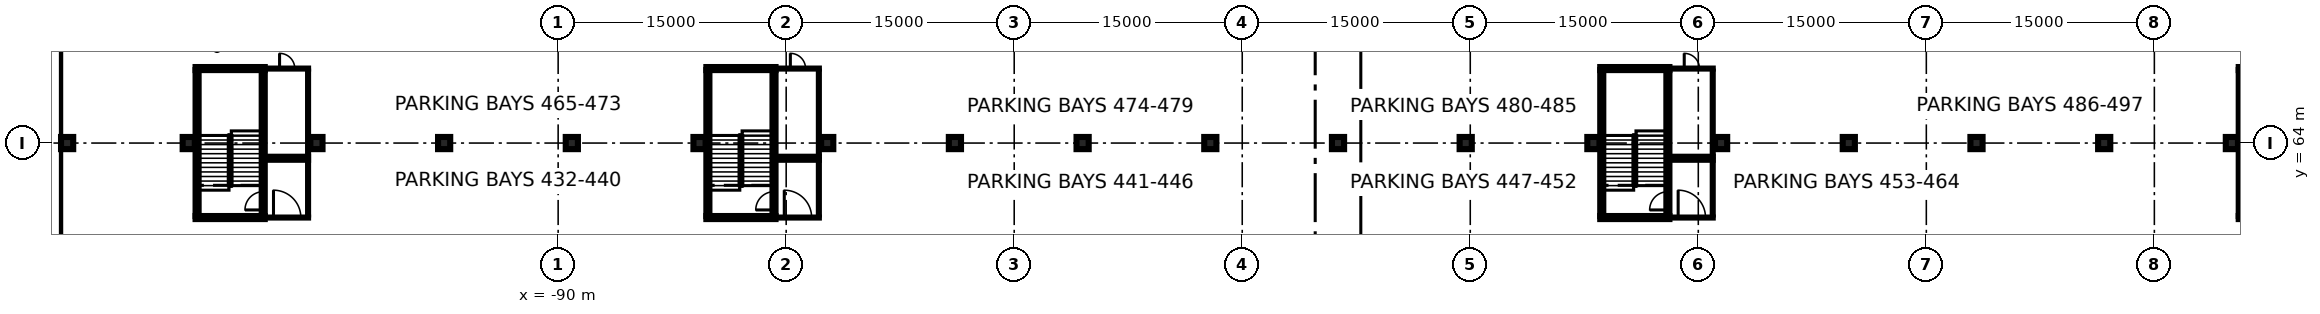
"""IFC4 building model, lengths in metres.
Left out: names, types, materials, properties, quantities, classifications, styles, units other than length and angle.
Written with IfcOpenShell. Run it as: python <this file> out.ifc"""

import sys

from ifc_helpers import new_model, si_unit, direction, frame, frame_2d, origin, origin_2d, place, context, subcontext, project, spatial, rectangle, extrude, element, fill, save


model = new_model("IFC4")
c1 = context("Model", 3, precision=1e-05, world=origin(), true_north=direction((0.0, 1.0)))
c2 = subcontext(c1, "Body", "Model", "MODEL_VIEW")
j1 = project(units=[si_unit("LENGTHUNIT", "METRE"), si_unit("PLANEANGLEUNIT", "RADIAN")], contexts=[c1])
p1 = place(None, origin())
s1 = spatial("IfcSite", under=j1, at=p1, CompositionType="ELEMENT")
p2 = place(p1, origin())
s2 = spatial("IfcBuilding", under=s1, at=p2, CompositionType="ELEMENT")
p3 = place(p2, frame((0.0, 0.0, -12.0)))
s3 = spatial("IfcBuildingStorey", under=s2, at=p3, CompositionType="ELEMENT", Elevation=-12.0)
p4 = place(p3, frame((-123.15, -80.0, 0.0), z_axis=(0.0, 0.0, 1.0), x_axis=(0.0, 1.0, 0.0)))
e1 = element("IfcWall", 1, at=p4, inside=s3, PredefinedType="USERDEFINED", context=c2, shape_type="SweptSolid", body=[
    extrude(rectangle(XDim=160.0, YDim=0.9, at=frame_2d((80.0, 0.0))), origin(), (0.0, 0.0, 1.0), 11.55),
])
p5 = place(p2, frame((0.0, 0.0, -3.6)))
s4 = spatial("IfcBuildingStorey", under=s2, at=p5, CompositionType="ELEMENT", Elevation=-3.6)
for number, where, z_axis, x_axis in (
    (2, (-122.3, 64.0, -0.4), (0.0, 0.0, 1.0), (1.0, 0.0, 0.0)),
    (3, (-114.3, 64.0, -0.4), (0.0, 0.0, 1.0), (1.0, 0.0, 0.0)),
    (4, (-105.9, 64.0, -0.4), (0.0, 0.0, 1.0), (1.0, 0.0, 0.0)),
    (5, (-97.5, 64.0, -0.4), (0.0, 0.0, 1.0), (1.0, 0.0, 0.0)),
    (6, (-89.1, 64.0, -0.4), (0.0, 0.0, 1.0), (1.0, 0.0, 0.0)),
    (7, (-80.7, 64.0, -0.4), (0.0, 0.0, 1.0), (1.0, 0.0, 0.0)),
    (8, (-72.3, 64.0, -0.4), (0.0, 0.0, 1.0), (1.0, 0.0, 0.0)),
    (9, (-63.9, 64.0, -0.4), (0.0, 0.0, 1.0), (1.0, 0.0, 0.0)),
    (10, (-55.5, 64.0, -0.4), (0.0, 0.0, 1.0), (1.0, 0.0, 0.0)),
    (11, (-47.1, 64.0, -0.4), (0.0, 0.0, 1.0), (1.0, 0.0, 0.0)),
    (12, (-38.7, 64.0, -0.4), (0.0, 0.0, 1.0), (1.0, 0.0, 0.0)),
    (13, (-30.3, 64.0, -0.4), (0.0, 0.0, 1.0), (1.0, 0.0, 0.0)),
    (14, (-21.9, 64.0, -0.4), (0.0, 0.0, 1.0), (1.0, 0.0, 0.0)),
    (15, (-13.5, 64.0, -0.4), (0.0, 0.0, 1.0), (1.0, 0.0, 0.0)),
    (16, (-5.1, 64.0, -0.4), (0.0, 0.0, 1.0), (1.0, 0.0, 0.0)),
    (17, (3.3, 64.0, -0.4), (0.0, 0.0, 1.0), (1.0, 0.0, 0.0)),
    (18, (11.7, 64.0, -0.4), (0.0, 0.0, 1.0), (1.0, 0.0, 0.0)),
    (19, (20.1, 64.0, -0.4), (0.0, 0.0, 1.0), (1.0, 0.0, 0.0)),
):
    element("IfcColumn", number, at=place(p5, frame(where, z_axis=z_axis, x_axis=x_axis)), inside=s4, PredefinedType="COLUMN", context=c2, shape_type="SweptSolid", body=[
        extrude(rectangle(XDim=0.8, YDim=0.8, at=origin_2d()), origin(), (0.0, 0.0, 1.0), 3.55),
    ])
p6 = place(p5, frame((-109.3, 59.1, 0.0), z_axis=(0.0, 0.0, 1.0), x_axis=(1.0, 0.0, 0.0)))
e20 = element("IfcWall", 20, at=p6, inside=s4, PredefinedType="PARTITIONING", context=c2, shape_type="SweptSolid", body=[
    extrude(rectangle(XDim=2.95, YDim=0.2, at=frame_2d((1.475, 0.0))), origin(), (0.0, 0.0, 1.0), 3.15),
])
p7 = place(p6, frame((0.575, 0.0, 0.0)))
e21 = element("IfcOpeningElement", 21, at=p7, cuts=e20, PredefinedType="OPENING", context=c2, shape_type="SweptSolid", body=[
    extrude(rectangle(XDim=1.8, YDim=2.1, at=frame_2d((0.9, 1.05))), frame((0.0, 0.11, 0.0), z_axis=(0.0, -1.0, 0.0), x_axis=(1.0, 0.0, 0.0)), (0.0, 0.0, 1.0), 0.22),
])
p8 = place(p5, frame((-109.3, 62.9, 0.0), z_axis=(0.0, 0.0, 1.0), x_axis=(1.0, 0.0, 0.0)))
e22 = element("IfcWall", 22, at=p8, inside=s4, PredefinedType="PARTITIONING", context=c2, shape_type="SweptSolid", body=[
    extrude(rectangle(XDim=2.95, YDim=0.2, at=frame_2d((1.475, 0.0))), origin(), (0.0, 0.0, 1.0), 3.15),
])
p9 = place(p5, frame((-106.45, 59.2, 0.0), z_axis=(0.0, 0.0, 1.0), x_axis=(0.0, 1.0, 0.0)))
e23 = element("IfcWall", 23, at=p9, inside=s4, PredefinedType="PARTITIONING", context=c2, shape_type="SweptSolid", body=[
    extrude(rectangle(XDim=3.6, YDim=0.2, at=frame_2d((1.8, 0.0))), origin(), (0.0, 0.0, 1.0), 3.15),
])
p10 = place(p5, frame((-109.3, 63.1, 0.0), z_axis=(0.0, 0.0, 1.0), x_axis=(1.0, 0.0, 0.0)))
e24 = element("IfcWall", 24, at=p10, inside=s4, PredefinedType="PARTITIONING", context=c2, shape_type="SweptSolid", body=[
    extrude(rectangle(XDim=2.95, YDim=0.2, at=frame_2d((1.475, 0.0))), origin(), (0.0, 0.0, 1.0), 3.15),
])
p11 = place(p5, frame((-109.3, 68.9, 0.0), z_axis=(0.0, 0.0, 1.0), x_axis=(1.0, 0.0, 0.0)))
e25 = element("IfcWall", 25, at=p11, inside=s4, PredefinedType="PARTITIONING", context=c2, shape_type="SweptSolid", body=[
    extrude(rectangle(XDim=2.95, YDim=0.2, at=frame_2d((1.475, 0.0))), origin(), (0.0, 0.0, 1.0), 3.15),
])
p12 = place(p11, frame((0.975, 0.0, 0.0)))
e26 = element("IfcOpeningElement", 26, at=p12, cuts=e25, PredefinedType="OPENING", context=c2, shape_type="SweptSolid", body=[
    extrude(rectangle(XDim=1.0, YDim=2.1, at=frame_2d((0.5, 1.05))), frame((0.0, 0.11, 0.0), z_axis=(0.0, -1.0, 0.0), x_axis=(1.0, 0.0, 0.0)), (0.0, 0.0, 1.0), 0.22),
])
p13 = place(p5, frame((-106.45, 63.2, 0.0), z_axis=(0.0, 0.0, 1.0), x_axis=(0.0, 1.0, 0.0)))
e27 = element("IfcWall", 27, at=p13, inside=s4, PredefinedType="PARTITIONING", context=c2, shape_type="SweptSolid", body=[
    extrude(rectangle(XDim=5.6, YDim=0.2, at=frame_2d((2.8, 0.0))), origin(), (0.0, 0.0, 1.0), 3.15),
])
p14 = place(p5, frame((-75.7, 59.1, 0.0), z_axis=(0.0, 0.0, 1.0), x_axis=(1.0, 0.0, 0.0)))
e28 = element("IfcWall", 28, at=p14, inside=s4, PredefinedType="PARTITIONING", context=c2, shape_type="SweptSolid", body=[
    extrude(rectangle(XDim=2.95, YDim=0.2, at=frame_2d((1.475, 0.0))), origin(), (0.0, 0.0, 1.0), 3.15),
])
p15 = place(p14, frame((0.575, 0.0, 0.0)))
e29 = element("IfcOpeningElement", 29, at=p15, cuts=e28, PredefinedType="OPENING", context=c2, shape_type="SweptSolid", body=[
    extrude(rectangle(XDim=1.8, YDim=2.1, at=frame_2d((0.9, 1.05))), frame((0.0, 0.11, 0.0), z_axis=(0.0, -1.0, 0.0), x_axis=(1.0, 0.0, 0.0)), (0.0, 0.0, 1.0), 0.22),
])
p16 = place(p5, frame((-75.7, 62.9, 0.0), z_axis=(0.0, 0.0, 1.0), x_axis=(1.0, 0.0, 0.0)))
e30 = element("IfcWall", 30, at=p16, inside=s4, PredefinedType="PARTITIONING", context=c2, shape_type="SweptSolid", body=[
    extrude(rectangle(XDim=2.95, YDim=0.2, at=frame_2d((1.475, 0.0))), origin(), (0.0, 0.0, 1.0), 3.15),
])
p17 = place(p5, frame((-72.85, 59.2, 0.0), z_axis=(0.0, 0.0, 1.0), x_axis=(0.0, 1.0, 0.0)))
e31 = element("IfcWall", 31, at=p17, inside=s4, PredefinedType="PARTITIONING", context=c2, shape_type="SweptSolid", body=[
    extrude(rectangle(XDim=3.6, YDim=0.2, at=frame_2d((1.8, 0.0))), origin(), (0.0, 0.0, 1.0), 3.15),
])
p18 = place(p5, frame((-75.7, 63.1, 0.0), z_axis=(0.0, 0.0, 1.0), x_axis=(1.0, 0.0, 0.0)))
e32 = element("IfcWall", 32, at=p18, inside=s4, PredefinedType="PARTITIONING", context=c2, shape_type="SweptSolid", body=[
    extrude(rectangle(XDim=2.95, YDim=0.2, at=frame_2d((1.475, 0.0))), origin(), (0.0, 0.0, 1.0), 3.15),
])
p19 = place(p5, frame((-75.7, 68.9, 0.0), z_axis=(0.0, 0.0, 1.0), x_axis=(1.0, 0.0, 0.0)))
e33 = element("IfcWall", 33, at=p19, inside=s4, PredefinedType="PARTITIONING", context=c2, shape_type="SweptSolid", body=[
    extrude(rectangle(XDim=2.95, YDim=0.2, at=frame_2d((1.475, 0.0))), origin(), (0.0, 0.0, 1.0), 3.15),
])
p20 = place(p19, frame((0.975, 0.0, 0.0)))
e34 = element("IfcOpeningElement", 34, at=p20, cuts=e33, PredefinedType="OPENING", context=c2, shape_type="SweptSolid", body=[
    extrude(rectangle(XDim=1.0, YDim=2.1, at=frame_2d((0.5, 1.05))), frame((0.0, 0.11, 0.0), z_axis=(0.0, -1.0, 0.0), x_axis=(1.0, 0.0, 0.0)), (0.0, 0.0, 1.0), 0.22),
])
p21 = place(p5, frame((-72.85, 63.2, 0.0), z_axis=(0.0, 0.0, 1.0), x_axis=(0.0, 1.0, 0.0)))
e35 = element("IfcWall", 35, at=p21, inside=s4, PredefinedType="PARTITIONING", context=c2, shape_type="SweptSolid", body=[
    extrude(rectangle(XDim=5.6, YDim=0.2, at=frame_2d((2.8, 0.0))), origin(), (0.0, 0.0, 1.0), 3.15),
])
p22 = place(p5, frame((-16.9, 59.1, 0.0), z_axis=(0.0, 0.0, 1.0), x_axis=(1.0, 0.0, 0.0)))
e36 = element("IfcWall", 36, at=p22, inside=s4, PredefinedType="PARTITIONING", context=c2, shape_type="SweptSolid", body=[
    extrude(rectangle(XDim=2.95, YDim=0.2, at=frame_2d((1.475, 0.0))), origin(), (0.0, 0.0, 1.0), 3.15),
])
p23 = place(p22, frame((0.575, 0.0, 0.0)))
e37 = element("IfcOpeningElement", 37, at=p23, cuts=e36, PredefinedType="OPENING", context=c2, shape_type="SweptSolid", body=[
    extrude(rectangle(XDim=1.8, YDim=2.1, at=frame_2d((0.9, 1.05))), frame((0.0, 0.11, 0.0), z_axis=(0.0, -1.0, 0.0), x_axis=(1.0, 0.0, 0.0)), (0.0, 0.0, 1.0), 0.22),
])
p24 = place(p5, frame((-16.9, 62.9, 0.0), z_axis=(0.0, 0.0, 1.0), x_axis=(1.0, 0.0, 0.0)))
e38 = element("IfcWall", 38, at=p24, inside=s4, PredefinedType="PARTITIONING", context=c2, shape_type="SweptSolid", body=[
    extrude(rectangle(XDim=2.95, YDim=0.2, at=frame_2d((1.475, 0.0))), origin(), (0.0, 0.0, 1.0), 3.15),
])
p25 = place(p5, frame((-14.05, 59.2, 0.0), z_axis=(0.0, 0.0, 1.0), x_axis=(0.0, 1.0, 0.0)))
e39 = element("IfcWall", 39, at=p25, inside=s4, PredefinedType="PARTITIONING", context=c2, shape_type="SweptSolid", body=[
    extrude(rectangle(XDim=3.6, YDim=0.2, at=frame_2d((1.8, 0.0))), origin(), (0.0, 0.0, 1.0), 3.15),
])
p26 = place(p5, frame((-16.9, 63.1, 0.0), z_axis=(0.0, 0.0, 1.0), x_axis=(1.0, 0.0, 0.0)))
e40 = element("IfcWall", 40, at=p26, inside=s4, PredefinedType="PARTITIONING", context=c2, shape_type="SweptSolid", body=[
    extrude(rectangle(XDim=2.95, YDim=0.2, at=frame_2d((1.475, 0.0))), origin(), (0.0, 0.0, 1.0), 3.15),
])
p27 = place(p5, frame((-16.9, 68.9, 0.0), z_axis=(0.0, 0.0, 1.0), x_axis=(1.0, 0.0, 0.0)))
e41 = element("IfcWall", 41, at=p27, inside=s4, PredefinedType="PARTITIONING", context=c2, shape_type="SweptSolid", body=[
    extrude(rectangle(XDim=2.95, YDim=0.2, at=frame_2d((1.475, 0.0))), origin(), (0.0, 0.0, 1.0), 3.15),
])
p28 = place(p27, frame((0.975, 0.0, 0.0)))
e42 = element("IfcOpeningElement", 42, at=p28, cuts=e41, PredefinedType="OPENING", context=c2, shape_type="SweptSolid", body=[
    extrude(rectangle(XDim=1.0, YDim=2.1, at=frame_2d((0.5, 1.05))), frame((0.0, 0.11, 0.0), z_axis=(0.0, -1.0, 0.0), x_axis=(1.0, 0.0, 0.0)), (0.0, 0.0, 1.0), 0.22),
])
p29 = place(p5, frame((-14.05, 63.2, 0.0), z_axis=(0.0, 0.0, 1.0), x_axis=(0.0, 1.0, 0.0)))
e43 = element("IfcWall", 43, at=p29, inside=s4, PredefinedType="PARTITIONING", context=c2, shape_type="SweptSolid", body=[
    extrude(rectangle(XDim=5.6, YDim=0.2, at=frame_2d((2.8, 0.0))), origin(), (0.0, 0.0, 1.0), 3.15),
])
p30 = place(p5, frame((-113.75, 59.2, 0.0), z_axis=(0.0, 0.0, 1.0), x_axis=(0.0, 1.0, 0.0)))
e44 = element("IfcWall", 44, at=p30, inside=s4, PredefinedType="SOLIDWALL", context=c2, shape_type="SweptSolid", body=[
    extrude(rectangle(XDim=9.6, YDim=0.2, at=frame_2d((4.8, 0.0))), origin(), (0.0, 0.0, 1.0), 3.15),
])
p31 = place(p5, frame((-109.4, 59.2, 0.0), z_axis=(0.0, 0.0, 1.0), x_axis=(0.0, 1.0, 0.0)))
e45 = element("IfcWall", 45, at=p31, inside=s4, PredefinedType="SOLIDWALL", context=c2, shape_type="SweptSolid", body=[
    extrude(rectangle(XDim=9.6, YDim=0.2, at=frame_2d((4.8, 0.0))), origin(), (0.0, 0.0, 1.0), 3.15),
])
p32 = place(p31, frame((0.4, 0.0, 0.0)))
e46 = element("IfcOpeningElement", 46, at=p32, cuts=e45, PredefinedType="OPENING", context=c2, shape_type="SweptSolid", body=[
    extrude(rectangle(XDim=1.2, YDim=2.1, at=frame_2d((0.6, 1.05))), frame((0.0, 0.11, 0.0), z_axis=(0.0, -1.0, 0.0), x_axis=(1.0, 0.0, 0.0)), (0.0, 0.0, 1.0), 0.22),
])
for number, where, z_axis, x_axis in (
    (47, (-109.3, 59.1, 0.0), (0.0, 0.0, 1.0), (-1.0, 0.0, 0.0)),
    (48, (-113.85, 68.9, 0.0), (0.0, 0.0, 1.0), (1.0, 0.0, 0.0)),
):
    element("IfcWall", number, at=place(p5, frame(where, z_axis=z_axis, x_axis=x_axis)), inside=s4, PredefinedType="SOLIDWALL", context=c2, shape_type="SweptSolid", body=[
        extrude(rectangle(XDim=4.55, YDim=0.2, at=frame_2d((2.275, 0.0))), origin(), (0.0, 0.0, 1.0), 3.15),
    ])
p33 = place(p5, frame((-80.15, 59.2, 0.0), z_axis=(0.0, 0.0, 1.0), x_axis=(0.0, 1.0, 0.0)))
e49 = element("IfcWall", 49, at=p33, inside=s4, PredefinedType="SOLIDWALL", context=c2, shape_type="SweptSolid", body=[
    extrude(rectangle(XDim=9.6, YDim=0.2, at=frame_2d((4.8, 0.0))), origin(), (0.0, 0.0, 1.0), 3.15),
])
p34 = place(p5, frame((-75.8, 59.2, 0.0), z_axis=(0.0, 0.0, 1.0), x_axis=(0.0, 1.0, 0.0)))
e50 = element("IfcWall", 50, at=p34, inside=s4, PredefinedType="SOLIDWALL", context=c2, shape_type="SweptSolid", body=[
    extrude(rectangle(XDim=9.6, YDim=0.2, at=frame_2d((4.8, 0.0))), origin(), (0.0, 0.0, 1.0), 3.15),
])
p35 = place(p34, frame((0.4, 0.0, 0.0)))
e51 = element("IfcOpeningElement", 51, at=p35, cuts=e50, PredefinedType="OPENING", context=c2, shape_type="SweptSolid", body=[
    extrude(rectangle(XDim=1.2, YDim=2.1, at=frame_2d((0.6, 1.05))), frame((0.0, 0.11, 0.0), z_axis=(0.0, -1.0, 0.0), x_axis=(1.0, 0.0, 0.0)), (0.0, 0.0, 1.0), 0.22),
])
for number, where, z_axis, x_axis in (
    (52, (-75.7, 59.1, 0.0), (0.0, 0.0, 1.0), (-1.0, 0.0, 0.0)),
    (53, (-80.25, 68.9, 0.0), (0.0, 0.0, 1.0), (1.0, 0.0, 0.0)),
):
    element("IfcWall", number, at=place(p5, frame(where, z_axis=z_axis, x_axis=x_axis)), inside=s4, PredefinedType="SOLIDWALL", context=c2, shape_type="SweptSolid", body=[
        extrude(rectangle(XDim=4.55, YDim=0.2, at=frame_2d((2.275, 0.0))), origin(), (0.0, 0.0, 1.0), 3.15),
    ])
p36 = place(p5, frame((-21.35, 59.2, 0.0), z_axis=(0.0, 0.0, 1.0), x_axis=(0.0, 1.0, 0.0)))
e54 = element("IfcWall", 54, at=p36, inside=s4, PredefinedType="SOLIDWALL", context=c2, shape_type="SweptSolid", body=[
    extrude(rectangle(XDim=9.6, YDim=0.2, at=frame_2d((4.8, 0.0))), origin(), (0.0, 0.0, 1.0), 3.15),
])
p37 = place(p5, frame((-17.0, 59.2, 0.0), z_axis=(0.0, 0.0, 1.0), x_axis=(0.0, 1.0, 0.0)))
e55 = element("IfcWall", 55, at=p37, inside=s4, PredefinedType="SOLIDWALL", context=c2, shape_type="SweptSolid", body=[
    extrude(rectangle(XDim=9.6, YDim=0.2, at=frame_2d((4.8, 0.0))), origin(), (0.0, 0.0, 1.0), 3.15),
])
p38 = place(p37, frame((0.4, 0.0, 0.0)))
e56 = element("IfcOpeningElement", 56, at=p38, cuts=e55, PredefinedType="OPENING", context=c2, shape_type="SweptSolid", body=[
    extrude(rectangle(XDim=1.2, YDim=2.1, at=frame_2d((0.6, 1.05))), frame((0.0, 0.11, 0.0), z_axis=(0.0, -1.0, 0.0), x_axis=(1.0, 0.0, 0.0)), (0.0, 0.0, 1.0), 0.22),
])
for number, where, z_axis, x_axis in (
    (57, (-16.9, 59.1, 0.0), (0.0, 0.0, 1.0), (-1.0, 0.0, 0.0)),
    (58, (-21.45, 68.9, 0.0), (0.0, 0.0, 1.0), (1.0, 0.0, 0.0)),
):
    element("IfcWall", number, at=place(p5, frame(where, z_axis=z_axis, x_axis=x_axis)), inside=s4, PredefinedType="SOLIDWALL", context=c2, shape_type="SweptSolid", body=[
        extrude(rectangle(XDim=4.55, YDim=0.2, at=frame_2d((2.275, 0.0))), origin(), (0.0, 0.0, 1.0), 3.15),
    ])
p39 = place(p5, frame((20.65, 59.2, 0.0), z_axis=(0.0, 0.0, 1.0), x_axis=(0.0, 1.0, 0.0)))
e59 = element("IfcWall", 59, at=p39, inside=s4, PredefinedType="SOLIDWALL", context=c2, shape_type="SweptSolid", body=[
    extrude(rectangle(XDim=9.6, YDim=0.2, at=frame_2d((4.8, 0.0))), origin(), (0.0, 0.0, 1.0), 3.15),
])
for number, where, z_axis, x_axis in (
    (60, (25.1, 59.1, 0.0), (0.0, 0.0, 1.0), (-1.0, 0.0, 0.0)),
    (61, (20.55, 68.9, 0.0), (0.0, 0.0, 1.0), (1.0, 0.0, 0.0)),
):
    element("IfcWall", number, at=place(p5, frame(where, z_axis=z_axis, x_axis=x_axis)), inside=s4, PredefinedType="SOLIDWALL", context=c2, shape_type="SweptSolid", body=[
        extrude(rectangle(XDim=4.55, YDim=0.2, at=frame_2d((2.275, 0.0))), origin(), (0.0, 0.0, 1.0), 3.15),
    ])
p40 = place(p7, origin())
e62 = element("IfcDoor", 62, at=p40, inside=s4, OperationType="DOUBLE_DOOR_SINGLE_SWING", PredefinedType="DOOR", context=c2, shape_type="SweptSolid", body=[
    extrude(rectangle(XDim=1.8, YDim=2.1, at=frame_2d((0.9, 1.05))), frame((0.0, 0.025, 0.0), z_axis=(0.0, -1.0, 0.0), x_axis=(1.0, 0.0, 0.0)), (0.0, 0.0, 1.0), 0.05),
])
fill(e21, e62)
p41 = place(p12, origin())
e63 = element("IfcDoor", 63, at=p41, inside=s4, OperationType="SINGLE_SWING_LEFT", PredefinedType="DOOR", context=c2, shape_type="SweptSolid", body=[
    extrude(rectangle(XDim=1.0, YDim=2.1, at=frame_2d((0.5, 1.05))), frame((0.0, 0.025, 0.0), z_axis=(0.0, -1.0, 0.0), x_axis=(1.0, 0.0, 0.0)), (0.0, 0.0, 1.0), 0.05),
])
fill(e26, e63)
p42 = place(p15, origin())
e64 = element("IfcDoor", 64, at=p42, inside=s4, OperationType="DOUBLE_DOOR_SINGLE_SWING", PredefinedType="DOOR", context=c2, shape_type="SweptSolid", body=[
    extrude(rectangle(XDim=1.8, YDim=2.1, at=frame_2d((0.9, 1.05))), frame((0.0, 0.025, 0.0), z_axis=(0.0, -1.0, 0.0), x_axis=(1.0, 0.0, 0.0)), (0.0, 0.0, 1.0), 0.05),
])
fill(e29, e64)
p43 = place(p20, origin())
e65 = element("IfcDoor", 65, at=p43, inside=s4, OperationType="SINGLE_SWING_LEFT", PredefinedType="DOOR", context=c2, shape_type="SweptSolid", body=[
    extrude(rectangle(XDim=1.0, YDim=2.1, at=frame_2d((0.5, 1.05))), frame((0.0, 0.025, 0.0), z_axis=(0.0, -1.0, 0.0), x_axis=(1.0, 0.0, 0.0)), (0.0, 0.0, 1.0), 0.05),
])
fill(e34, e65)
p44 = place(p23, origin())
e66 = element("IfcDoor", 66, at=p44, inside=s4, OperationType="DOUBLE_DOOR_SINGLE_SWING", PredefinedType="DOOR", context=c2, shape_type="SweptSolid", body=[
    extrude(rectangle(XDim=1.8, YDim=2.1, at=frame_2d((0.9, 1.05))), frame((0.0, 0.025, 0.0), z_axis=(0.0, -1.0, 0.0), x_axis=(1.0, 0.0, 0.0)), (0.0, 0.0, 1.0), 0.05),
])
fill(e37, e66)
p45 = place(p28, origin())
e67 = element("IfcDoor", 67, at=p45, inside=s4, OperationType="SINGLE_SWING_LEFT", PredefinedType="DOOR", context=c2, shape_type="SweptSolid", body=[
    extrude(rectangle(XDim=1.0, YDim=2.1, at=frame_2d((0.5, 1.05))), frame((0.0, 0.025, 0.0), z_axis=(0.0, -1.0, 0.0), x_axis=(1.0, 0.0, 0.0)), (0.0, 0.0, 1.0), 0.05),
])
fill(e42, e67)
p46 = place(p32, origin())
e68 = element("IfcDoor", 68, at=p46, inside=s4, OperationType="SINGLE_SWING_LEFT", PredefinedType="DOOR", context=c2, shape_type="SweptSolid", body=[
    extrude(rectangle(XDim=1.2, YDim=2.1, at=frame_2d((0.6, 1.05))), frame((0.0, 0.025, 0.0), z_axis=(0.0, -1.0, 0.0), x_axis=(1.0, 0.0, 0.0)), (0.0, 0.0, 1.0), 0.05),
])
fill(e46, e68)
p47 = place(p35, origin())
e69 = element("IfcDoor", 69, at=p47, inside=s4, OperationType="SINGLE_SWING_LEFT", PredefinedType="DOOR", context=c2, shape_type="SweptSolid", body=[
    extrude(rectangle(XDim=1.2, YDim=2.1, at=frame_2d((0.6, 1.05))), frame((0.0, 0.025, 0.0), z_axis=(0.0, -1.0, 0.0), x_axis=(1.0, 0.0, 0.0)), (0.0, 0.0, 1.0), 0.05),
])
fill(e51, e69)
p48 = place(p38, origin())
e70 = element("IfcDoor", 70, at=p48, inside=s4, OperationType="SINGLE_SWING_LEFT", PredefinedType="DOOR", context=c2, shape_type="SweptSolid", body=[
    extrude(rectangle(XDim=1.2, YDim=2.1, at=frame_2d((0.6, 1.05))), frame((0.0, 0.025, 0.0), z_axis=(0.0, -1.0, 0.0), x_axis=(1.0, 0.0, 0.0)), (0.0, 0.0, 1.0), 0.05),
])
fill(e56, e70)
save(model, sys.argv[1])
